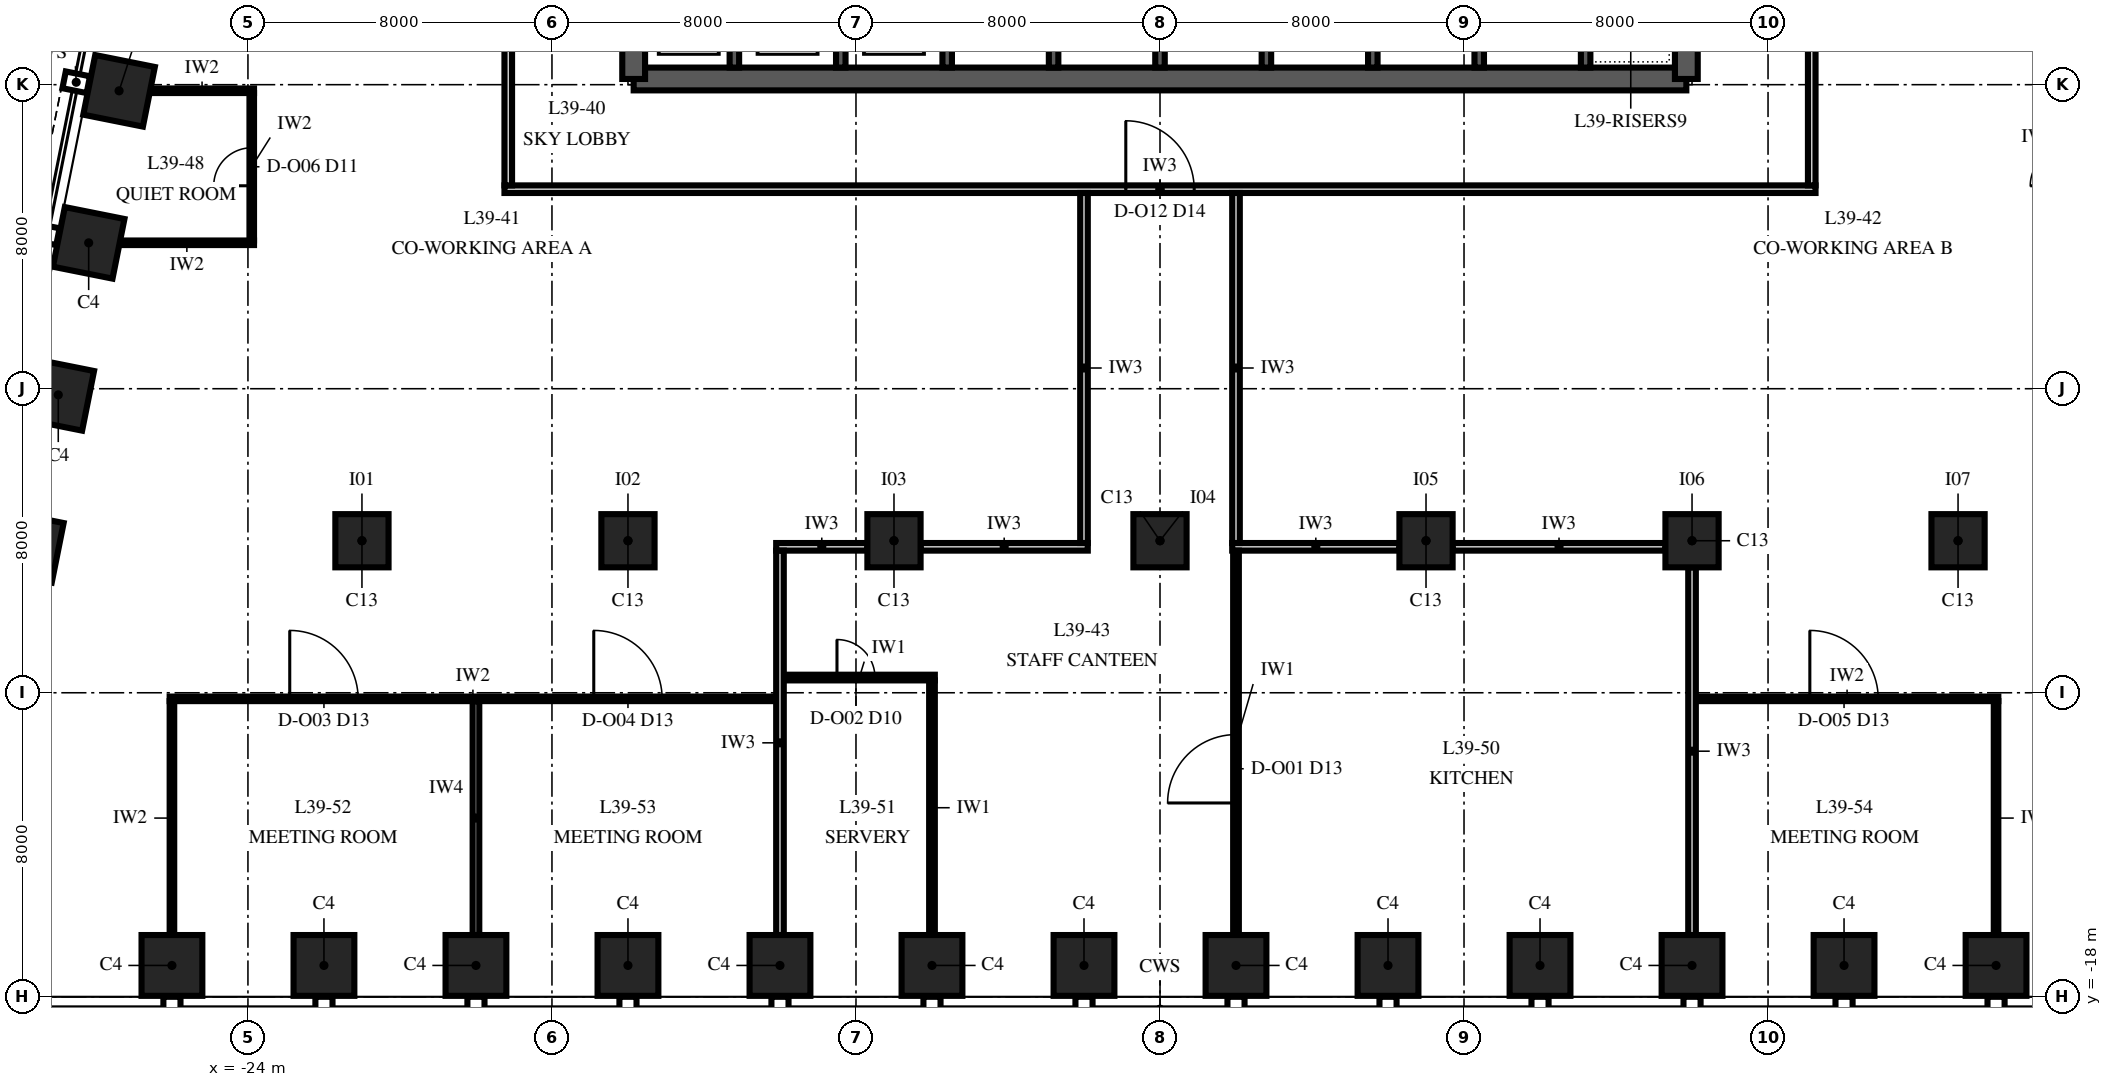
"""IFC4 building model, lengths in metres.
Left out: names, types, materials, properties, quantities, classifications, styles, units other than length and angle.
Written with IfcOpenShell. Run it as: python <this file> out.ifc"""

import sys

from ifc_helpers import new_model, si_unit, direction, frame, frame_2d, origin, origin_2d, place, context, subcontext, project, spatial, polyline, rectangle, outline, extrude, element, fill, save


model = new_model("IFC4")
c1 = context("Model", 3, precision=1e-05, world=origin(), true_north=direction((0.0, 1.0)))
c2 = subcontext(c1, "Body", "Model", "MODEL_VIEW")
j1 = project(units=[si_unit("LENGTHUNIT", "METRE"), si_unit("PLANEANGLEUNIT", "RADIAN")], contexts=[c1])
p1 = place(None, origin())
s1 = spatial("IfcSite", under=j1, at=p1, CompositionType="ELEMENT")
p2 = place(p1, origin())
s2 = spatial("IfcBuilding", under=s1, at=p2, CompositionType="ELEMENT")
p3 = place(p2, frame((0.0, 0.0, 173.0)))
s3 = spatial("IfcBuildingStorey", under=s2, at=p3, CompositionType="ELEMENT", Elevation=173.0)
for number, where, z_axis, x_axis in (
    (1, (-26.0, -17.175, 0.0), (0.0, 0.0, 1.0), (1.0, 0.0, 0.0)),
    (2, (-22.0, -17.175, 0.0), (0.0, 0.0, 1.0), (1.0, 0.0, 0.0)),
    (3, (-18.0, -17.175, 0.0), (0.0, 0.0, 1.0), (1.0, 0.0, 0.0)),
    (4, (-14.0, -17.175, 0.0), (0.0, 0.0, 1.0), (1.0, 0.0, 0.0)),
    (5, (-10.0, -17.175, 0.0), (0.0, 0.0, 1.0), (1.0, 0.0, 0.0)),
    (6, (-6.0, -17.175, 0.0), (0.0, 0.0, 1.0), (1.0, 0.0, 0.0)),
    (7, (-2.0, -17.175, 0.0), (0.0, 0.0, 1.0), (1.0, 0.0, 0.0)),
    (8, (2.0, -17.175, 0.0), (0.0, 0.0, 1.0), (1.0, 0.0, 0.0)),
    (9, (6.0, -17.175, 0.0), (0.0, 0.0, 1.0), (1.0, 0.0, 0.0)),
    (10, (10.0, -17.175, 0.0), (0.0, 0.0, 1.0), (1.0, 0.0, 0.0)),
    (11, (14.0, -17.175, 0.0), (0.0, 0.0, 1.0), (1.0, 0.0, 0.0)),
    (12, (18.0, -17.175, 0.0), (0.0, 0.0, 1.0), (1.0, 0.0, 0.0)),
    (13, (22.0, -17.175, 0.0), (0.0, 0.0, 1.0), (1.0, 0.0, 0.0)),
    (14, (-27.391, 5.838, 0.0), (0.0, 0.0, 1.0), (-0.196, -0.981, 0.0)),
    (15, (-28.191, 1.838, 0.0), (0.0, 0.0, 1.0), (-0.196, -0.981, 0.0)),
    (16, (-28.991, -2.162, 0.0), (0.0, 0.0, 1.0), (-0.196, -0.981, 0.0)),
    (17, (-29.791, -6.162, 0.0), (0.0, 0.0, 1.0), (-0.196, -0.981, 0.0)),
):
    element("IfcColumn", number, at=place(p3, frame(where, z_axis=z_axis, x_axis=x_axis)), inside=s3, PredefinedType="COLUMN", context=c2, shape_type="SweptSolid", body=[
        extrude(rectangle(XDim=1.6, YDim=1.6, at=origin_2d()), origin(), (0.0, 0.0, 1.0), 5.0),
    ])
for number, where, z_axis, x_axis in (
    (18, (-21.0, -6.0, 0.0), (0.0, 0.0, 1.0), (1.0, 0.0, 0.0)),
    (19, (-14.0, -6.0, 0.0), (0.0, 0.0, 1.0), (1.0, 0.0, 0.0)),
    (20, (-7.0, -6.0, 0.0), (0.0, 0.0, 1.0), (1.0, 0.0, 0.0)),
    (21, (0.0, -6.0, 0.0), (0.0, 0.0, 1.0), (1.0, 0.0, 0.0)),
    (22, (7.0, -6.0, 0.0), (0.0, 0.0, 1.0), (1.0, 0.0, 0.0)),
    (23, (14.0, -6.0, 0.0), (0.0, 0.0, 1.0), (1.0, 0.0, 0.0)),
    (24, (21.0, -6.0, 0.0), (0.0, 0.0, 1.0), (1.0, 0.0, 0.0)),
):
    element("IfcColumn", number, at=place(p3, frame(where, z_axis=z_axis, x_axis=x_axis)), inside=s3, PredefinedType="COLUMN", context=c2, shape_type="SweptSolid", body=[
        extrude(rectangle(XDim=1.4, YDim=1.4, at=origin_2d()), origin(), (0.0, 0.0, 1.0), 5.0),
    ])
p4 = place(p3, frame((-13.85, 6.15, 0.0), z_axis=(0.0, 0.0, 1.0), x_axis=(1.0, 0.0, 0.0)))
e25 = element("IfcWall", 25, at=p4, inside=s3, PredefinedType="SHEAR", context=c2, shape_type="SweptSolid", body=[
    extrude(rectangle(XDim=27.7, YDim=0.6, at=frame_2d((13.85, 0.0))), origin(), (0.0, 0.0, 1.0), 5.0),
])
p5 = place(p3, frame((13.85, 6.15, 0.0), z_axis=(0.0, 0.0, 1.0), x_axis=(0.0, 1.0, 0.0)))
e26 = element("IfcWall", 26, at=p5, inside=s3, PredefinedType="SHEAR", context=c2, shape_type="SweptSolid", body=[
    extrude(outline(polyline([(0.0, -0.3), (17.7, -0.3), (17.7, 0.0), (17.4, 0.0), (17.4, 0.3), (0.3, 0.3), (0.3, 0.0), (0.0, 0.0), (0.0, -0.3)])), origin(), (0.0, 0.0, 1.0), 5.0),
])
p6 = place(p5, frame((4.15, 0.0, 0.0)))
e27 = element("IfcOpeningElement", 27, at=p6, cuts=e26, PredefinedType="OPENING", context=c2, shape_type="SweptSolid", body=[
    extrude(rectangle(XDim=1.8, YDim=2.4, at=frame_2d((0.9, 1.2))), frame((0.0, 0.315, 0.0), z_axis=(0.0, -1.0, 0.0), x_axis=(1.0, 0.0, 0.0)), (0.0, 0.0, 1.0), 0.63),
])
p7 = place(p3, frame((-13.85, 23.85, 0.0), z_axis=(0.0, 0.0, 1.0), x_axis=(0.0, -1.0, 0.0)))
e28 = element("IfcWall", 28, at=p7, inside=s3, PredefinedType="SHEAR", context=c2, shape_type="SweptSolid", body=[
    extrude(outline(polyline([(0.0, -0.3), (17.7, -0.3), (17.7, 0.0), (17.4, 0.0), (17.4, 0.3), (0.3, 0.3), (0.3, 0.0), (0.0, 0.0), (0.0, -0.3)])), origin(), (0.0, 0.0, 1.0), 5.0),
])
p8 = place(p7, frame((11.75, 0.0, 0.0)))
e29 = element("IfcOpeningElement", 29, at=p8, cuts=e28, PredefinedType="OPENING", context=c2, shape_type="SweptSolid", body=[
    extrude(rectangle(XDim=1.8, YDim=2.4, at=frame_2d((0.9, 1.2))), frame((0.0, 0.315, 0.0), z_axis=(0.0, -1.0, 0.0), x_axis=(1.0, 0.0, 0.0)), (0.0, 0.0, 1.0), 0.63),
])
for number, where, z_axis, x_axis in (
    (30, (-11.2, 6.45, 0.0), (0.0, 0.0, 1.0), (0.0, 1.0, 0.0)),
    (31, (-8.4, 6.45, 0.0), (0.0, 0.0, 1.0), (0.0, 1.0, 0.0)),
    (32, (-5.6, 6.45, 0.0), (0.0, 0.0, 1.0), (0.0, 1.0, 0.0)),
    (33, (-2.8, 6.45, 0.0), (0.0, 0.0, 1.0), (0.0, 1.0, 0.0)),
    (34, (0.0, 6.45, 0.0), (0.0, 0.0, 1.0), (0.0, 1.0, 0.0)),
    (35, (2.8, 6.45, 0.0), (0.0, 0.0, 1.0), (0.0, 1.0, 0.0)),
    (36, (5.6, 6.45, 0.0), (0.0, 0.0, 1.0), (0.0, 1.0, 0.0)),
    (37, (8.4, 6.45, 0.0), (0.0, 0.0, 1.0), (0.0, 1.0, 0.0)),
    (38, (11.2, 6.45, 0.0), (0.0, 0.0, 1.0), (0.0, 1.0, 0.0)),
):
    element("IfcWall", number, at=place(p3, frame(where, z_axis=z_axis, x_axis=x_axis)), inside=s3, PredefinedType="SHEAR", context=c2, shape_type="SweptSolid", body=[
        extrude(rectangle(XDim=2.825, YDim=0.25, at=frame_2d((1.413, 0.0))), origin(), (0.0, 0.0, 1.0), 5.0),
    ])
p9 = place(p3, frame((-26.06, -10.16, 0.0), z_axis=(0.0, 0.0, 1.0), x_axis=(1.0, 0.0, 0.0)))
e39 = element("IfcWall", 39, at=p9, inside=s3, PredefinedType="PARTITIONING", context=c2, shape_type="SweptSolid", body=[
    extrude(rectangle(XDim=15.96, YDim=0.12, at=frame_2d((7.98, 0.0))), origin(), (0.0, 0.0, 1.0), 4.25),
])
p10 = place(p9, frame((3.16, 0.0, 0.0)))
e40 = element("IfcOpeningElement", 40, at=p10, cuts=e39, PredefinedType="OPENING", context=c2, shape_type="SweptSolid", body=[
    extrude(rectangle(XDim=1.8, YDim=2.4, at=frame_2d((0.9, 1.2))), frame((0.0, 0.075, 0.0), z_axis=(0.0, -1.0, 0.0), x_axis=(1.0, 0.0, 0.0)), (0.0, 0.0, 1.0), 0.15),
])
p11 = place(p9, frame((11.16, 0.0, 0.0)))
e41 = element("IfcOpeningElement", 41, at=p11, cuts=e39, PredefinedType="OPENING", context=c2, shape_type="SweptSolid", body=[
    extrude(rectangle(XDim=1.8, YDim=2.4, at=frame_2d((0.9, 1.2))), frame((0.0, 0.075, 0.0), z_axis=(0.0, -1.0, 0.0), x_axis=(1.0, 0.0, 0.0)), (0.0, 0.0, 1.0), 0.15),
])
p12 = place(p3, frame((14.1, -10.16, 0.0), z_axis=(0.0, 0.0, 1.0), x_axis=(1.0, 0.0, 0.0)))
e42 = element("IfcWall", 42, at=p12, inside=s3, PredefinedType="PARTITIONING", context=c2, shape_type="SweptSolid", body=[
    extrude(rectangle(XDim=7.96, YDim=0.12, at=frame_2d((3.98, 0.0))), origin(), (0.0, 0.0, 1.0), 4.25),
])
p13 = place(p12, frame((3.0, 0.0, 0.0)))
e43 = element("IfcOpeningElement", 43, at=p13, cuts=e42, PredefinedType="OPENING", context=c2, shape_type="SweptSolid", body=[
    extrude(rectangle(XDim=1.8, YDim=2.4, at=frame_2d((0.9, 1.2))), frame((0.0, 0.075, 0.0), z_axis=(0.0, -1.0, 0.0), x_axis=(1.0, 0.0, 0.0)), (0.0, 0.0, 1.0), 0.15),
])
p14 = place(p3, frame((-9.9, -9.6, 0.0), z_axis=(0.0, 0.0, 1.0), x_axis=(1.0, 0.0, 0.0)))
e44 = element("IfcWall", 44, at=p14, inside=s3, PredefinedType="PARTITIONING", context=c2, shape_type="SweptSolid", body=[
    extrude(rectangle(XDim=3.975, YDim=0.15, at=frame_2d((1.987, 0.0))), origin(), (0.0, 0.0, 1.0), 4.25),
])
p15 = place(p14, frame((1.4, 0.0, 0.0)))
e45 = element("IfcOpeningElement", 45, at=p15, cuts=e44, PredefinedType="OPENING", context=c2, shape_type="SweptSolid", body=[
    extrude(rectangle(XDim=1.0, YDim=2.3, at=frame_2d((0.5, 1.15))), frame((0.0, 0.09, 0.0), z_axis=(0.0, -1.0, 0.0), x_axis=(1.0, 0.0, 0.0)), (0.0, 0.0, 1.0), 0.18),
])
p16 = place(p3, frame((-10.1, -6.16, 0.0), z_axis=(0.0, 0.0, 1.0), x_axis=(1.0, 0.0, 0.0)))
e46 = element("IfcWall", 46, at=p16, inside=s3, PredefinedType="PARTITIONING", context=c2, shape_type="SweptSolid", body=[
    extrude(rectangle(XDim=2.4, YDim=0.2, at=frame_2d((1.2, 0.0))), origin(), (0.0, 0.0, 1.0), 3.842),
])
for number, where, z_axis, x_axis in (
    (47, (-6.3, -6.16, 0.0), (0.0, 0.0, 1.0), (1.0, 0.0, 0.0)),
    (48, (1.9, -6.16, 0.0), (0.0, 0.0, 1.0), (1.0, 0.0, 0.0)),
):
    element("IfcWall", number, at=place(p3, frame(where, z_axis=z_axis, x_axis=x_axis)), inside=s3, PredefinedType="PARTITIONING", context=c2, shape_type="SweptSolid", body=[
        extrude(rectangle(XDim=4.4, YDim=0.2, at=frame_2d((2.2, 0.0))), origin(), (0.0, 0.0, 1.0), 3.842),
    ])
p17 = place(p3, frame((7.7, -6.16, 0.0), z_axis=(0.0, 0.0, 1.0), x_axis=(1.0, 0.0, 0.0)))
e49 = element("IfcWall", 49, at=p17, inside=s3, PredefinedType="PARTITIONING", context=c2, shape_type="SweptSolid", body=[
    extrude(rectangle(XDim=5.6, YDim=0.2, at=frame_2d((2.8, 0.0))), origin(), (0.0, 0.0, 1.0), 3.842),
])
p18 = place(p3, frame((-27.375, 1.84, 0.0), z_axis=(0.0, 0.0, 1.0), x_axis=(1.0, 0.0, 0.0)))
e50 = element("IfcWall", 50, at=p18, inside=s3, PredefinedType="PARTITIONING", context=c2, shape_type="SweptSolid", body=[
    extrude(rectangle(XDim=3.535, YDim=0.12, at=frame_2d((1.767, 0.0))), origin(), (0.0, 0.0, 1.0), 4.25),
])
p19 = place(p3, frame((-17.25, 3.25, 0.0), z_axis=(0.0, 0.0, 1.0), x_axis=(1.0, 0.0, 0.0)))
e51 = element("IfcWall", 51, at=p19, inside=s3, PredefinedType="PARTITIONING", context=c2, shape_type="SweptSolid", body=[
    extrude(rectangle(XDim=34.5, YDim=0.2, at=frame_2d((17.25, 0.0))), origin(), (0.0, 0.0, 1.0), 4.25),
])
p20 = place(p19, frame((16.35, 0.0, 0.0)))
e52 = element("IfcOpeningElement", 52, at=p20, cuts=e51, PredefinedType="OPENING", context=c2, shape_type="SweptSolid", body=[
    extrude(rectangle(XDim=1.8, YDim=2.4, at=frame_2d((0.9, 1.2))), frame((0.0, 0.115, 0.0), z_axis=(0.0, -1.0, 0.0), x_axis=(1.0, 0.0, 0.0)), (0.0, 0.0, 1.0), 0.23),
])
p21 = place(p3, frame((-26.575, 5.84, 0.0), z_axis=(0.0, 0.0, 1.0), x_axis=(1.0, 0.0, 0.0)))
e53 = element("IfcWall", 53, at=p21, inside=s3, PredefinedType="PARTITIONING", context=c2, shape_type="SweptSolid", body=[
    extrude(rectangle(XDim=2.735, YDim=0.12, at=frame_2d((1.367, 0.0))), origin(), (0.0, 0.0, 1.0), 3.842),
])
p22 = place(p3, frame((-26.0, -16.375, 0.0), z_axis=(0.0, 0.0, 1.0), x_axis=(0.0, 1.0, 0.0)))
e54 = element("IfcWall", 54, at=p22, inside=s3, PredefinedType="PARTITIONING", context=c2, shape_type="SweptSolid", body=[
    extrude(rectangle(XDim=6.155, YDim=0.12, at=frame_2d((3.078, 0.0))), origin(), (0.0, 0.0, 1.0), 4.25),
])
p23 = place(p3, frame((-23.9, 1.9, 0.0), z_axis=(0.0, 0.0, 1.0), x_axis=(0.0, 1.0, 0.0)))
e55 = element("IfcWall", 55, at=p23, inside=s3, PredefinedType="PARTITIONING", context=c2, shape_type="SweptSolid", body=[
    extrude(rectangle(XDim=3.88, YDim=0.12, at=frame_2d((1.94, 0.0))), origin(), (0.0, 0.0, 1.0), 4.85),
])
p24 = place(p23, frame((1.44, 0.0, 0.0)))
e56 = element("IfcOpeningElement", 56, at=p24, cuts=e55, PredefinedType="OPENING", context=c2, shape_type="SweptSolid", body=[
    extrude(rectangle(XDim=1.0, YDim=2.4, at=frame_2d((0.5, 1.2))), frame((0.0, 0.075, 0.0), z_axis=(0.0, -1.0, 0.0), x_axis=(1.0, 0.0, 0.0)), (0.0, 0.0, 1.0), 0.15),
])
p25 = place(p3, frame((-18.0, -16.375, 0.0), z_axis=(0.0, 0.0, 1.0), x_axis=(0.0, 1.0, 0.0)))
e57 = element("IfcWall", 57, at=p25, inside=s3, PredefinedType="PARTITIONING", context=c2, shape_type="SweptSolid", body=[
    extrude(rectangle(XDim=6.155, YDim=0.175, at=frame_2d((3.078, 0.0))), origin(), (0.0, 0.0, 1.0), 4.25),
])
p26 = place(p3, frame((-17.15, 3.35, 0.0), z_axis=(0.0, 0.0, 1.0), x_axis=(0.0, 1.0, 0.0)))
e58 = element("IfcWall", 58, at=p26, inside=s3, PredefinedType="PARTITIONING", context=c2, shape_type="SweptSolid", body=[
    extrude(rectangle(XDim=23.3, YDim=0.2, at=frame_2d((11.65, 0.0))), origin(), (0.0, 0.0, 1.0), 3.842),
])
p27 = place(p26, frame((5.05, 0.0, 0.0)))
e59 = element("IfcOpeningElement", 59, at=p27, cuts=e58, PredefinedType="OPENING", context=c2, shape_type="SweptSolid", body=[
    extrude(rectangle(XDim=1.2, YDim=2.4, at=frame_2d((0.6, 1.2))), frame((0.0, 0.115, 0.0), z_axis=(0.0, -1.0, 0.0), x_axis=(1.0, 0.0, 0.0)), (0.0, 0.0, 1.0), 0.23),
])
p28 = place(p3, frame((-10.0, -16.375, 0.0), z_axis=(0.0, 0.0, 1.0), x_axis=(0.0, 1.0, 0.0)))
e60 = element("IfcWall", 60, at=p28, inside=s3, PredefinedType="PARTITIONING", context=c2, shape_type="SweptSolid", body=[
    extrude(rectangle(XDim=10.115, YDim=0.2, at=frame_2d((5.058, 0.0))), origin(), (0.0, 0.0, 1.0), 4.25),
])
p29 = place(p3, frame((-6.0, -16.375, 0.0), z_axis=(0.0, 0.0, 1.0), x_axis=(0.0, 1.0, 0.0)))
e61 = element("IfcWall", 61, at=p29, inside=s3, PredefinedType="PARTITIONING", context=c2, shape_type="SweptSolid", body=[
    extrude(rectangle(XDim=6.7, YDim=0.15, at=frame_2d((3.35, 0.0))), origin(), (0.0, 0.0, 1.0), 4.25),
])
p30 = place(p3, frame((-2.0, -6.06, 0.0), z_axis=(0.0, 0.0, 1.0), x_axis=(0.0, 1.0, 0.0)))
e62 = element("IfcWall", 62, at=p30, inside=s3, PredefinedType="PARTITIONING", context=c2, shape_type="SweptSolid", body=[
    extrude(rectangle(XDim=9.21, YDim=0.2, at=frame_2d((4.605, 0.0))), origin(), (0.0, 0.0, 1.0), 3.842),
])
p31 = place(p3, frame((2.0, -16.375, 0.0), z_axis=(0.0, 0.0, 1.0), x_axis=(0.0, 1.0, 0.0)))
e63 = element("IfcWall", 63, at=p31, inside=s3, PredefinedType="PARTITIONING", context=c2, shape_type="SweptSolid", body=[
    extrude(rectangle(XDim=10.115, YDim=0.15, at=frame_2d((5.058, 0.0))), origin(), (0.0, 0.0, 1.0), 4.25),
])
p32 = place(p31, frame((3.475, 0.0, 0.0)))
e64 = element("IfcOpeningElement", 64, at=p32, cuts=e63, PredefinedType="OPENING", context=c2, shape_type="SweptSolid", body=[
    extrude(rectangle(XDim=1.8, YDim=2.4, at=frame_2d((0.9, 1.2))), frame((0.0, 0.09, 0.0), z_axis=(0.0, -1.0, 0.0), x_axis=(1.0, 0.0, 0.0)), (0.0, 0.0, 1.0), 0.18),
])
p33 = place(p3, frame((2.0, -6.06, 0.0), z_axis=(0.0, 0.0, 1.0), x_axis=(0.0, 1.0, 0.0)))
e65 = element("IfcWall", 65, at=p33, inside=s3, PredefinedType="PARTITIONING", context=c2, shape_type="SweptSolid", body=[
    extrude(rectangle(XDim=9.21, YDim=0.2, at=frame_2d((4.605, 0.0))), origin(), (0.0, 0.0, 1.0), 3.842),
])
p34 = place(p3, frame((14.0, -16.375, 0.0), z_axis=(0.0, 0.0, 1.0), x_axis=(0.0, 1.0, 0.0)))
e66 = element("IfcWall", 66, at=p34, inside=s3, PredefinedType="PARTITIONING", context=c2, shape_type="SweptSolid", body=[
    extrude(rectangle(XDim=9.675, YDim=0.2, at=frame_2d((4.837, 0.0))), origin(), (0.0, 0.0, 1.0), 4.25),
])
p35 = place(p3, frame((17.15, 3.35, 0.0), z_axis=(0.0, 0.0, 1.0), x_axis=(0.0, 1.0, 0.0)))
e67 = element("IfcWall", 67, at=p35, inside=s3, PredefinedType="PARTITIONING", context=c2, shape_type="SweptSolid", body=[
    extrude(rectangle(XDim=23.3, YDim=0.2, at=frame_2d((11.65, 0.0))), origin(), (0.0, 0.0, 1.0), 3.842),
])
p36 = place(p35, frame((5.05, 0.0, 0.0)))
e68 = element("IfcOpeningElement", 68, at=p36, cuts=e67, PredefinedType="OPENING", context=c2, shape_type="SweptSolid", body=[
    extrude(rectangle(XDim=1.2, YDim=2.4, at=frame_2d((0.6, 1.2))), frame((0.0, 0.115, 0.0), z_axis=(0.0, -1.0, 0.0), x_axis=(1.0, 0.0, 0.0)), (0.0, 0.0, 1.0), 0.23),
])
p37 = place(p3, frame((22.0, -16.375, 0.0), z_axis=(0.0, 0.0, 1.0), x_axis=(0.0, 1.0, 0.0)))
e69 = element("IfcWall", 69, at=p37, inside=s3, PredefinedType="PARTITIONING", context=c2, shape_type="SweptSolid", body=[
    extrude(rectangle(XDim=6.155, YDim=0.12, at=frame_2d((3.078, 0.0))), origin(), (0.0, 0.0, 1.0), 4.25),
])
p38 = place(p32, origin())
e70 = element("IfcDoor", 70, at=p38, inside=s3, OperationType="DOUBLE_DOOR_SINGLE_SWING", PredefinedType="DOOR", context=c2, shape_type="SweptSolid", body=[
    extrude(rectangle(XDim=1.8, YDim=2.4, at=frame_2d((0.9, 1.2))), frame((0.0, 0.075, 0.0), z_axis=(0.0, -1.0, 0.0), x_axis=(1.0, 0.0, 0.0)), (0.0, 0.0, 1.0), 0.149),
])
fill(e64, e70)
p39 = place(p15, origin())
e71 = element("IfcDoor", 71, at=p39, inside=s3, OperationType="SINGLE_SWING_LEFT", PredefinedType="DOOR", context=c2, shape_type="SweptSolid", body=[
    extrude(rectangle(XDim=1.0, YDim=2.3, at=frame_2d((0.5, 1.15))), frame((0.0, 0.075, 0.0), z_axis=(0.0, -1.0, 0.0), x_axis=(1.0, 0.0, 0.0)), (0.0, 0.0, 1.0), 0.149),
])
fill(e45, e71)
p40 = place(p10, origin())
e72 = element("IfcDoor", 72, at=p40, inside=s3, OperationType="DOUBLE_DOOR_SINGLE_SWING", PredefinedType="DOOR", context=c2, shape_type="SweptSolid", body=[
    extrude(rectangle(XDim=1.8, YDim=2.4, at=frame_2d((0.9, 1.2))), frame((0.0, 0.06, 0.0), z_axis=(0.0, -1.0, 0.0), x_axis=(1.0, 0.0, 0.0)), (0.0, 0.0, 1.0), 0.12),
])
fill(e40, e72)
p41 = place(p11, origin())
e73 = element("IfcDoor", 73, at=p41, inside=s3, OperationType="DOUBLE_DOOR_SINGLE_SWING", PredefinedType="DOOR", context=c2, shape_type="SweptSolid", body=[
    extrude(rectangle(XDim=1.8, YDim=2.4, at=frame_2d((0.9, 1.2))), frame((0.0, 0.06, 0.0), z_axis=(0.0, -1.0, 0.0), x_axis=(1.0, 0.0, 0.0)), (0.0, 0.0, 1.0), 0.12),
])
fill(e41, e73)
p42 = place(p13, origin())
e74 = element("IfcDoor", 74, at=p42, inside=s3, OperationType="DOUBLE_DOOR_SINGLE_SWING", PredefinedType="DOOR", context=c2, shape_type="SweptSolid", body=[
    extrude(rectangle(XDim=1.8, YDim=2.4, at=frame_2d((0.9, 1.2))), frame((0.0, 0.06, 0.0), z_axis=(0.0, -1.0, 0.0), x_axis=(1.0, 0.0, 0.0)), (0.0, 0.0, 1.0), 0.12),
])
fill(e43, e74)
p43 = place(p24, origin())
e75 = element("IfcDoor", 75, at=p43, inside=s3, OperationType="SINGLE_SWING_RIGHT", PredefinedType="DOOR", context=c2, shape_type="SweptSolid", body=[
    extrude(rectangle(XDim=1.0, YDim=2.4, at=frame_2d((0.5, 1.2))), frame((0.0, 0.06, 0.0), z_axis=(0.0, -1.0, 0.0), x_axis=(1.0, 0.0, 0.0)), (0.0, 0.0, 1.0), 0.12),
])
fill(e56, e75)
p44 = place(p20, origin())
e76 = element("IfcDoor", 76, at=p44, inside=s3, OperationType="DOUBLE_DOOR_SINGLE_SWING", PredefinedType="DOOR", context=c2, shape_type="SweptSolid", body=[
    extrude(rectangle(XDim=1.8, YDim=2.4, at=frame_2d((0.9, 1.2))), frame((0.0, 0.1, 0.0), z_axis=(0.0, -1.0, 0.0), x_axis=(1.0, 0.0, 0.0)), (0.0, 0.0, 1.0), 0.199),
])
fill(e52, e76)
save(model, sys.argv[1])
